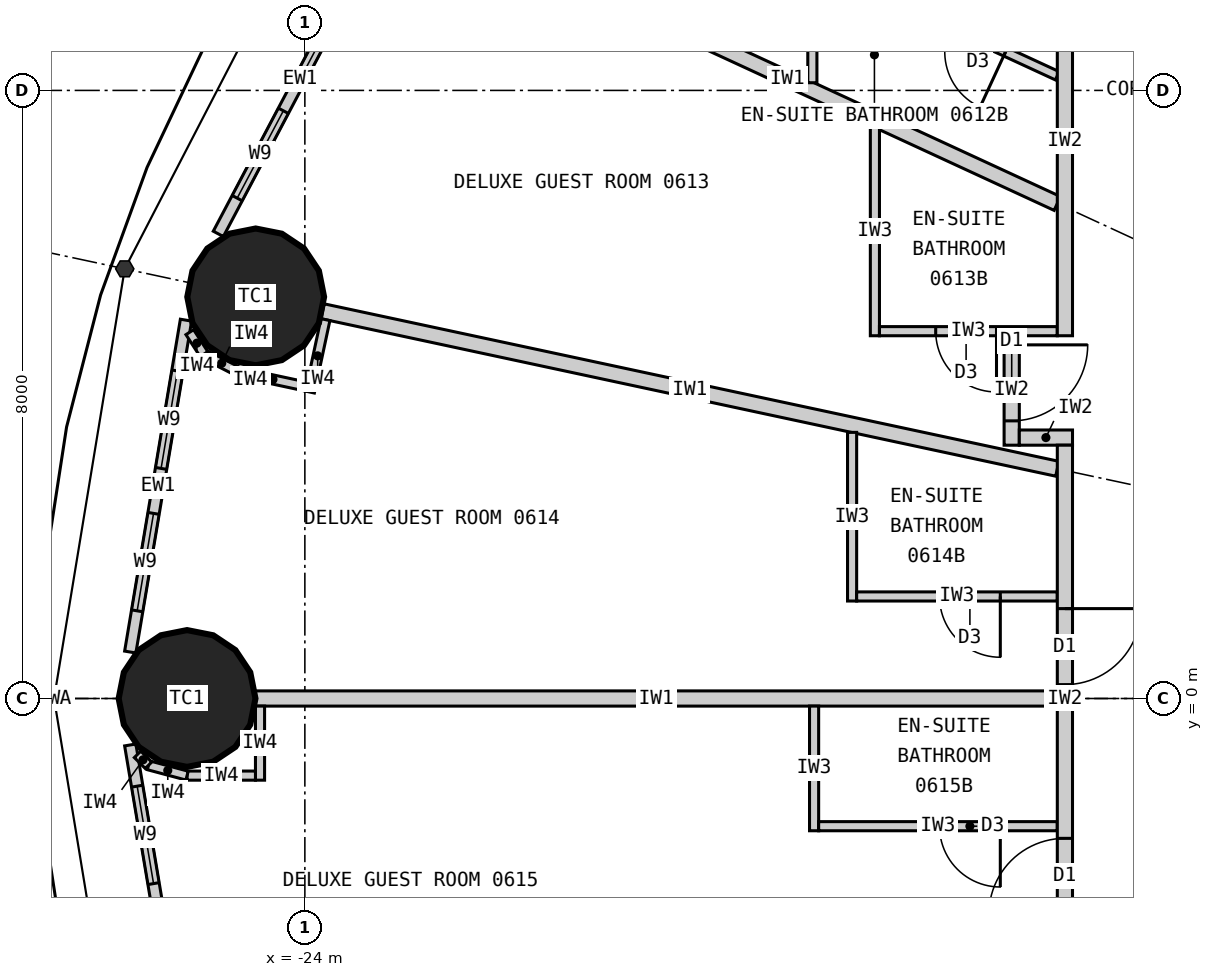
"""IFC4 building model, lengths in metres.
Left out: names, types, materials, properties, quantities, classifications, styles, units other than length and angle.
Written with IfcOpenShell. Run it as: python <this file> out.ifc"""

import sys

from ifc_helpers import new_model, si_unit, direction, frame, frame_2d, origin, origin_2d, place, context, subcontext, project, spatial, rectangle, circle, extrude, element, fill, save


model = new_model("IFC4")
c1 = context("Model", 3, precision=1e-05, world=origin(), true_north=direction((0.0, 1.0)))
c2 = subcontext(c1, "Body", "Model", "MODEL_VIEW")
j1 = project(units=[si_unit("LENGTHUNIT", "METRE"), si_unit("PLANEANGLEUNIT", "RADIAN")], contexts=[c1])
p1 = place(None, origin())
s1 = spatial("IfcSite", under=j1, at=p1, CompositionType="ELEMENT")
p2 = place(p1, origin())
s2 = spatial("IfcBuilding", under=s1, at=p2, CompositionType="ELEMENT")
p3 = place(p2, frame((0.0, 0.0, 32.7)))
s3 = spatial("IfcBuildingStorey", under=s2, at=p3, CompositionType="ELEMENT", Elevation=32.7)
for number, where, z_axis, x_axis in (
    (1, (-24.647, 5.283, 0.0), (0.0, 0.0, 1.0), (1.0, 0.0, 0.0)),
    (2, (-25.55, 0.0, 0.0), (0.0, 0.0, 1.0), (1.0, 0.0, 0.0)),
):
    element("IfcColumn", number, at=place(p3, frame(where, z_axis=z_axis, x_axis=x_axis)), inside=s3, PredefinedType="COLUMN", context=c2, shape_type="SweptSolid", body=[
        extrude(circle(Radius=0.9, at=origin_2d()), origin(), (0.0, 0.0, 1.0), 3.3),
    ])
p4 = place(p3, frame((-22.986, 10.185, 0.0), z_axis=(0.0, 0.0, 1.0), x_axis=(-0.467303182954, -0.884097129959, 0.0)))
e3 = element("IfcWall", 3, at=p4, inside=s3, PredefinedType="ELEMENTEDWALL", context=c2, shape_type="SweptSolid", body=[
    extrude(rectangle(XDim=4.606, YDim=0.15, at=frame_2d((2.303, 0.0))), origin(), (0.0, 0.0, 1.0), 3.12),
])
p5 = place(p4, frame((0.875, 0.0, 0.9)))
e4 = element("IfcOpeningElement", 4, at=p5, cuts=e3, PredefinedType="OPENING", context=c2, shape_type="SweptSolid", body=[
    extrude(rectangle(XDim=1.3, YDim=1.9, at=frame_2d((0.65, 0.95))), frame((0.0, 0.085, 0.0), z_axis=(0.0, -1.0, 0.0), x_axis=(1.0, 0.0, 0.0)), (0.0, 0.0, 1.0), 0.17),
])
p6 = place(p4, frame((2.775, 0.0, 0.9)))
e5 = element("IfcOpeningElement", 5, at=p6, cuts=e3, PredefinedType="OPENING", context=c2, shape_type="SweptSolid", body=[
    extrude(rectangle(XDim=1.3, YDim=1.9, at=frame_2d((0.65, 0.95))), frame((0.0, 0.085, 0.0), z_axis=(0.0, -1.0, 0.0), x_axis=(1.0, 0.0, 0.0)), (0.0, 0.0, 1.0), 0.17),
])
p7 = place(p3, frame((-25.564, 4.978, 0.0), z_axis=(0.0, 0.0, 1.0), x_axis=(-0.165641751141, -0.986185991727, 0.0)))
e6 = element("IfcWall", 6, at=p7, inside=s3, PredefinedType="ELEMENTEDWALL", context=c2, shape_type="SweptSolid", body=[
    extrude(rectangle(XDim=4.428, YDim=0.15, at=frame_2d((2.214, 0.0))), origin(), (0.0, 0.0, 1.0), 3.12),
])
p8 = place(p7, frame((0.678, 0.0, 0.9)))
e7 = element("IfcOpeningElement", 7, at=p8, cuts=e6, PredefinedType="OPENING", context=c2, shape_type="SweptSolid", body=[
    extrude(rectangle(XDim=1.3, YDim=1.9, at=frame_2d((0.65, 0.95))), frame((0.0, 0.085, 0.0), z_axis=(0.0, -1.0, 0.0), x_axis=(1.0, 0.0, 0.0)), (0.0, 0.0, 1.0), 0.17),
])
p9 = place(p7, frame((2.578, 0.0, 0.9)))
e8 = element("IfcOpeningElement", 8, at=p9, cuts=e6, PredefinedType="OPENING", context=c2, shape_type="SweptSolid", body=[
    extrude(rectangle(XDim=1.3, YDim=1.9, at=frame_2d((0.65, 0.95))), frame((0.0, 0.085, 0.0), z_axis=(0.0, -1.0, 0.0), x_axis=(1.0, 0.0, 0.0)), (0.0, 0.0, 1.0), 0.17),
])
p10 = place(p3, frame((-26.297, -0.611, 0.0), z_axis=(0.0, 0.0, 1.0), x_axis=(0.165641751141, -0.986185991727, 0.0)))
e9 = element("IfcWall", 9, at=p10, inside=s3, PredefinedType="ELEMENTEDWALL", context=c2, shape_type="SweptSolid", body=[
    extrude(rectangle(XDim=4.428, YDim=0.15, at=frame_2d((2.214, 0.0))), origin(), (0.0, 0.0, 1.0), 3.12),
])
p11 = place(p10, frame((0.55, 0.0, 0.9)))
e10 = element("IfcOpeningElement", 10, at=p11, cuts=e9, PredefinedType="OPENING", context=c2, shape_type="SweptSolid", body=[
    extrude(rectangle(XDim=1.3, YDim=1.9, at=frame_2d((0.65, 0.95))), frame((0.0, 0.085, 0.0), z_axis=(0.0, -1.0, 0.0), x_axis=(1.0, 0.0, 0.0)), (0.0, 0.0, 1.0), 0.17),
])
p12 = place(p10, frame((2.45, 0.0, 0.9)))
e11 = element("IfcOpeningElement", 11, at=p12, cuts=e9, PredefinedType="OPENING", context=c2, shape_type="SweptSolid", body=[
    extrude(rectangle(XDim=1.3, YDim=1.9, at=frame_2d((0.65, 0.95))), frame((0.0, 0.085, 0.0), z_axis=(0.0, -1.0, 0.0), x_axis=(1.0, 0.0, 0.0)), (0.0, 0.0, 1.0), 0.17),
])
p13 = place(p3, frame((-14.1, 6.512, 0.0), z_axis=(0.0, 0.0, 1.0), x_axis=(-0.907842433118, 0.41931147925, 0.0)))
e12 = element("IfcWall", 12, at=p13, inside=s3, PredefinedType="PARTITIONING", context=c2, shape_type="SweptSolid", body=[
    extrude(rectangle(XDim=7.823, YDim=0.2, at=frame_2d((3.912, 0.0))), origin(), (0.0, 0.0, 1.0), 2.32),
])
p14 = place(p3, frame((-14.1, 3.022, 0.0), z_axis=(0.0, 0.0, 1.0), x_axis=(-0.977786510688, 0.209603290805, 0.0)))
e13 = element("IfcWall", 13, at=p14, inside=s3, PredefinedType="PARTITIONING", context=c2, shape_type="SweptSolid", body=[
    extrude(rectangle(XDim=9.887, YDim=0.2, at=frame_2d((4.943, 0.0))), origin(), (0.0, 0.0, 1.0), 2.32),
])
p15 = place(p3, frame((-14.1, 0.0, 0.0), z_axis=(0.0, 0.0, 1.0), x_axis=(-1.0, 0.0, 0.0)))
e14 = element("IfcWall", 14, at=p15, inside=s3, PredefinedType="PARTITIONING", context=c2, shape_type="SweptSolid", body=[
    extrude(rectangle(XDim=10.55, YDim=0.2, at=frame_2d((5.275, 0.0))), origin(), (0.0, 0.0, 1.0), 2.27),
])
p16 = place(p3, frame((-17.323, 8.101, 0.0), z_axis=(0.0, 0.0, 1.0), x_axis=(0.0, 1.0, 0.0)))
e15 = element("IfcWall", 15, at=p16, inside=s3, PredefinedType="PARTITIONING", context=c2, shape_type="SweptSolid", body=[
    extrude(rectangle(XDim=1.64, YDim=0.12, at=frame_2d((0.82, 0.0))), origin(), (0.0, 0.0, 1.0), 3.12),
])
p17 = place(p3, frame((-14.1, 8.193, 0.0), z_axis=(0.0, 0.0, 1.0), x_axis=(-0.907836493557, 0.419324338628, 0.0)))
e16 = element("IfcWall", 16, at=p17, inside=s3, PredefinedType="PARTITIONING", context=c2, shape_type="SweptSolid", body=[
    extrude(rectangle(XDim=3.49, YDim=0.12, at=frame_2d((1.745, 0.0))), origin(), (0.0, 0.0, 1.0), 3.12),
])
p18 = place(p17, frame((0.75, 0.0, 0.0)))
e17 = element("IfcOpeningElement", 17, at=p18, cuts=e16, PredefinedType="OPENING", context=c2, shape_type="SweptSolid", body=[
    extrude(rectangle(XDim=0.8, YDim=2.1, at=frame_2d((0.4, 1.05))), frame((0.0, 0.07, 0.0), z_axis=(0.0, -1.0, 0.0), x_axis=(1.0, 0.0, 0.0)), (0.0, 0.0, 1.0), 0.14),
])
p19 = place(p3, frame((-16.5, 7.521, 0.0), z_axis=(0.0, 0.0, 1.0), x_axis=(0.0, -1.0, 0.0)))
e18 = element("IfcWall", 18, at=p19, inside=s3, PredefinedType="PARTITIONING", context=c2, shape_type="SweptSolid", body=[
    extrude(rectangle(XDim=2.749, YDim=0.12, at=frame_2d((1.374, 0.0))), origin(), (0.0, 0.0, 1.0), 3.12),
])
p20 = place(p3, frame((-14.1, 4.833, 0.0), z_axis=(0.0, 0.0, 1.0), x_axis=(-1.0, 0.0, 0.0)))
e19 = element("IfcWall", 19, at=p20, inside=s3, PredefinedType="PARTITIONING", context=c2, shape_type="SweptSolid", body=[
    extrude(rectangle(XDim=2.34, YDim=0.12, at=frame_2d((1.17, 0.0))), origin(), (0.0, 0.0, 1.0), 3.12),
])
p21 = place(p20, frame((0.8, 0.0, 0.0)))
e20 = element("IfcOpeningElement", 20, at=p21, cuts=e19, PredefinedType="OPENING", context=c2, shape_type="SweptSolid", body=[
    extrude(rectangle(XDim=0.8, YDim=2.1, at=frame_2d((0.4, 1.05))), frame((0.0, 0.07, 0.0), z_axis=(0.0, -1.0, 0.0), x_axis=(1.0, 0.0, 0.0)), (0.0, 0.0, 1.0), 0.14),
])
p22 = place(p3, frame((-16.8, 3.501, 0.0), z_axis=(0.0, 0.0, 1.0), x_axis=(0.0, -1.0, 0.0)))
e21 = element("IfcWall", 21, at=p22, inside=s3, PredefinedType="PARTITIONING", context=c2, shape_type="SweptSolid", body=[
    extrude(rectangle(XDim=2.219, YDim=0.12, at=frame_2d((1.109, 0.0))), origin(), (0.0, 0.0, 1.0), 3.12),
])
p23 = place(p3, frame((-14.1, 1.343, 0.0), z_axis=(0.0, 0.0, 1.0), x_axis=(-1.0, 0.0, 0.0)))
e22 = element("IfcWall", 22, at=p23, inside=s3, PredefinedType="PARTITIONING", context=c2, shape_type="SweptSolid", body=[
    extrude(rectangle(XDim=2.64, YDim=0.12, at=frame_2d((1.32, 0.0))), origin(), (0.0, 0.0, 1.0), 3.12),
])
p24 = place(p23, frame((0.75, 0.0, 0.0)))
e23 = element("IfcOpeningElement", 23, at=p24, cuts=e22, PredefinedType="OPENING", context=c2, shape_type="SweptSolid", body=[
    extrude(rectangle(XDim=0.8, YDim=2.1, at=frame_2d((0.4, 1.05))), frame((0.0, 0.07, 0.0), z_axis=(0.0, -1.0, 0.0), x_axis=(1.0, 0.0, 0.0)), (0.0, 0.0, 1.0), 0.14),
])
p25 = place(p3, frame((-17.3, -0.1, 0.0), z_axis=(0.0, 0.0, 1.0), x_axis=(0.0, -1.0, 0.0)))
e24 = element("IfcWall", 24, at=p25, inside=s3, PredefinedType="PARTITIONING", context=c2, shape_type="SweptSolid", body=[
    extrude(rectangle(XDim=1.64, YDim=0.12, at=frame_2d((0.82, 0.0))), origin(), (0.0, 0.0, 1.0), 3.12),
])
p26 = place(p3, frame((-14.1, -1.68, 0.0), z_axis=(0.0, 0.0, 1.0), x_axis=(-1.0, 0.0, 0.0)))
e25 = element("IfcWall", 25, at=p26, inside=s3, PredefinedType="PARTITIONING", context=c2, shape_type="SweptSolid", body=[
    extrude(rectangle(XDim=3.14, YDim=0.12, at=frame_2d((1.57, 0.0))), origin(), (0.0, 0.0, 1.0), 3.12),
])
p27 = place(p26, frame((0.75, 0.0, 0.0)))
e26 = element("IfcOpeningElement", 26, at=p27, cuts=e25, PredefinedType="OPENING", context=c2, shape_type="SweptSolid", body=[
    extrude(rectangle(XDim=0.8, YDim=2.1, at=frame_2d((0.4, 1.05))), frame((0.0, 0.07, 0.0), z_axis=(0.0, -1.0, 0.0), x_axis=(1.0, 0.0, 0.0)), (0.0, 0.0, 1.0), 0.14),
])
p28 = place(p3, frame((-14.7, 4.772, 0.0), z_axis=(0.0, 0.0, 1.0), x_axis=(0.0, -1.0, 0.0)))
e27 = element("IfcWall", 27, at=p28, inside=s3, PredefinedType="PARTITIONING", context=c2, shape_type="SweptSolid", body=[
    extrude(rectangle(XDim=1.44, YDim=0.2, at=frame_2d((0.72, 0.0))), origin(), (0.0, 0.0, 1.0), 3.12),
])
p29 = place(p28, frame((0.12, 0.0, 0.0)))
e28 = element("IfcOpeningElement", 28, at=p29, cuts=e27, PredefinedType="OPENING", context=c2, shape_type="SweptSolid", body=[
    extrude(rectangle(XDim=1.0, YDim=2.2, at=frame_2d((0.5, 1.1))), frame((0.0, 0.11, 0.0), z_axis=(0.0, -1.0, 0.0), x_axis=(1.0, 0.0, 0.0)), (0.0, 0.0, 1.0), 0.22),
])
p30 = place(p3, frame((-13.9, 3.433, 0.0), z_axis=(0.0, 0.0, 1.0), x_axis=(-1.0, 0.0, 0.0)))
e29 = element("IfcWall", 29, at=p30, inside=s3, PredefinedType="PARTITIONING", context=c2, shape_type="SweptSolid", body=[
    extrude(rectangle(XDim=0.7, YDim=0.2, at=frame_2d((0.35, 0.0))), origin(), (0.0, 0.0, 1.0), 2.32),
])
p31 = place(p3, frame((-14.0, 9.9, 0.0), z_axis=(0.0, 0.0, 1.0), x_axis=(0.0, -1.0, 0.0)))
e30 = element("IfcWall", 30, at=p31, inside=s3, PredefinedType="PARTITIONING", context=c2, shape_type="SweptSolid", body=[
    extrude(rectangle(XDim=5.127, YDim=0.2, at=frame_2d((2.564, 0.0))), origin(), (0.0, 0.0, 1.0), 3.12),
])
p32 = place(p31, frame((0.103, 0.0, 0.0)))
e31 = element("IfcOpeningElement", 31, at=p32, cuts=e30, PredefinedType="OPENING", context=c2, shape_type="SweptSolid", body=[
    extrude(rectangle(XDim=1.0, YDim=2.2, at=frame_2d((0.5, 1.1))), frame((0.0, 0.11, 0.0), z_axis=(0.0, -1.0, 0.0), x_axis=(1.0, 0.0, 0.0)), (0.0, 0.0, 1.0), 0.22),
])
p33 = place(p3, frame((-14.0, 3.333, 0.0), z_axis=(0.0, 0.0, 1.0), x_axis=(0.0, -1.0, 0.0)))
e32 = element("IfcWall", 32, at=p33, inside=s3, PredefinedType="PARTITIONING", context=c2, shape_type="SweptSolid", body=[
    extrude(rectangle(XDim=6.665, YDim=0.2, at=frame_2d((3.333, 0.0))), origin(), (0.0, 0.0, 1.0), 3.12),
])
p34 = place(p33, frame((2.15, 0.0, 0.0)))
e33 = element("IfcOpeningElement", 33, at=p34, cuts=e32, PredefinedType="OPENING", context=c2, shape_type="SweptSolid", body=[
    extrude(rectangle(XDim=1.0, YDim=2.2, at=frame_2d((0.5, 1.1))), frame((0.0, 0.11, 0.0), z_axis=(0.0, -1.0, 0.0), x_axis=(1.0, 0.0, 0.0)), (0.0, 0.0, 1.0), 0.22),
])
p35 = place(p33, frame((5.173, 0.0, 0.0)))
e34 = element("IfcOpeningElement", 34, at=p35, cuts=e32, PredefinedType="OPENING", context=c2, shape_type="SweptSolid", body=[
    extrude(rectangle(XDim=1.0, YDim=2.2, at=frame_2d((0.5, 1.1))), frame((0.0, 0.11, 0.0), z_axis=(0.0, -1.0, 0.0), x_axis=(1.0, 0.0, 0.0)), (0.0, 0.0, 1.0), 0.22),
])
p36 = place(p3, frame((-23.729, 4.984, 0.0), z_axis=(0.0, 0.0, 1.0), x_axis=(-0.20968306268, -0.977769406979, 0.0)))
e35 = element("IfcWall", 35, at=p36, inside=s3, PredefinedType="PARTITIONING", context=c2, shape_type="SweptSolid", body=[
    extrude(rectangle(XDim=0.975, YDim=0.12, at=frame_2d((0.487, 0.0))), origin(), (0.0, 0.0, 1.0), 3.12),
])
p37 = place(p3, frame((-23.98, 4.103, 0.0), z_axis=(0.0, 0.0, 1.0), x_axis=(-0.977762694187, 0.209714362543, 0.0)))
e36 = element("IfcWall", 36, at=p37, inside=s3, PredefinedType="PARTITIONING", context=c2, shape_type="SweptSolid", body=[
    extrude(rectangle(XDim=0.9, YDim=0.12, at=frame_2d((0.45, 0.0))), origin(), (0.0, 0.0, 1.0), 3.12),
])
p38 = place(p3, frame((-24.86, 4.291, 0.0), z_axis=(0.0, 0.0, 1.0), x_axis=(-0.890204323062, 0.455561481254, 0.0)))
e37 = element("IfcWall", 37, at=p38, inside=s3, PredefinedType="PARTITIONING", context=c2, shape_type="SweptSolid", body=[
    extrude(rectangle(XDim=0.525, YDim=0.12, at=frame_2d((0.263, 0.0))), origin(), (0.0, 0.0, 1.0), 3.12),
])
p39 = place(p3, frame((-25.327, 4.531, 0.0), z_axis=(0.0, 0.0, 1.0), x_axis=(-0.543516034791, 0.839398784801, 0.0)))
e38 = element("IfcWall", 38, at=p39, inside=s3, PredefinedType="PARTITIONING", context=c2, shape_type="SweptSolid", body=[
    extrude(rectangle(XDim=0.344, YDim=0.12, at=frame_2d((0.172, 0.0))), origin(), (0.0, 0.0, 1.0), 3.12),
])
p40 = place(p3, frame((-24.59, -0.1, 0.0), z_axis=(0.0, 0.0, 1.0), x_axis=(0.0, -1.0, 0.0)))
e39 = element("IfcWall", 39, at=p40, inside=s3, PredefinedType="PARTITIONING", context=c2, shape_type="SweptSolid", body=[
    extrude(rectangle(XDim=0.974, YDim=0.12, at=frame_2d((0.487, 0.0))), origin(), (0.0, 0.0, 1.0), 3.12),
])
p41 = place(p3, frame((-24.65, -1.015, 0.0), z_axis=(0.0, 0.0, 1.0), x_axis=(-1.0, 0.0, 0.0)))
e40 = element("IfcWall", 40, at=p41, inside=s3, PredefinedType="PARTITIONING", context=c2, shape_type="SweptSolid", body=[
    extrude(rectangle(XDim=0.9, YDim=0.12, at=frame_2d((0.45, 0.0))), origin(), (0.0, 0.0, 1.0), 3.12),
])
p42 = place(p3, frame((-25.55, -1.015, 0.0), z_axis=(0.0, 0.0, 1.0), x_axis=(-0.96590239779, 0.258906465625, 0.0)))
e41 = element("IfcWall", 41, at=p42, inside=s3, PredefinedType="PARTITIONING", context=c2, shape_type="SweptSolid", body=[
    extrude(rectangle(XDim=0.525, YDim=0.12, at=frame_2d((0.263, 0.0))), origin(), (0.0, 0.0, 1.0), 3.12),
])
p43 = place(p3, frame((-26.057, -0.879, 0.0), z_axis=(0.0, 0.0, 1.0), x_axis=(-0.707106781187, 0.707106781187, 0.0)))
e42 = element("IfcWall", 42, at=p43, inside=s3, PredefinedType="PARTITIONING", context=c2, shape_type="SweptSolid", body=[
    extrude(rectangle(XDim=0.204, YDim=0.12, at=frame_2d((0.102, 0.0))), origin(), (0.0, 0.0, 1.0), 3.12),
])
p44 = place(p5, origin())
e43 = element("IfcWindow", 43, at=p44, inside=s3, PartitioningType="SINGLE_PANEL", PredefinedType="WINDOW", context=c2, shape_type="SweptSolid", body=[
    extrude(rectangle(XDim=1.3, YDim=1.9, at=frame_2d((0.65, 0.95))), frame((0.0, 0.03, 0.0), z_axis=(0.0, -1.0, 0.0), x_axis=(1.0, 0.0, 0.0)), (0.0, 0.0, 1.0), 0.06),
])
fill(e4, e43)
p45 = place(p6, origin())
e44 = element("IfcWindow", 44, at=p45, inside=s3, PartitioningType="SINGLE_PANEL", PredefinedType="WINDOW", context=c2, shape_type="SweptSolid", body=[
    extrude(rectangle(XDim=1.3, YDim=1.9, at=frame_2d((0.65, 0.95))), frame((0.0, 0.03, 0.0), z_axis=(0.0, -1.0, 0.0), x_axis=(1.0, 0.0, 0.0)), (0.0, 0.0, 1.0), 0.06),
])
fill(e5, e44)
p46 = place(p8, origin())
e45 = element("IfcWindow", 45, at=p46, inside=s3, PartitioningType="SINGLE_PANEL", PredefinedType="WINDOW", context=c2, shape_type="SweptSolid", body=[
    extrude(rectangle(XDim=1.3, YDim=1.9, at=frame_2d((0.65, 0.95))), frame((0.0, 0.03, 0.0), z_axis=(0.0, -1.0, 0.0), x_axis=(1.0, 0.0, 0.0)), (0.0, 0.0, 1.0), 0.06),
])
fill(e7, e45)
p47 = place(p9, origin())
e46 = element("IfcWindow", 46, at=p47, inside=s3, PartitioningType="SINGLE_PANEL", PredefinedType="WINDOW", context=c2, shape_type="SweptSolid", body=[
    extrude(rectangle(XDim=1.3, YDim=1.9, at=frame_2d((0.65, 0.95))), frame((0.0, 0.03, 0.0), z_axis=(0.0, -1.0, 0.0), x_axis=(1.0, 0.0, 0.0)), (0.0, 0.0, 1.0), 0.06),
])
fill(e8, e46)
p48 = place(p11, origin())
e47 = element("IfcWindow", 47, at=p48, inside=s3, PartitioningType="SINGLE_PANEL", PredefinedType="WINDOW", context=c2, shape_type="SweptSolid", body=[
    extrude(rectangle(XDim=1.3, YDim=1.9, at=frame_2d((0.65, 0.95))), frame((0.0, 0.03, 0.0), z_axis=(0.0, -1.0, 0.0), x_axis=(1.0, 0.0, 0.0)), (0.0, 0.0, 1.0), 0.06),
])
fill(e10, e47)
p49 = place(p18, origin())
e48 = element("IfcDoor", 48, at=p49, inside=s3, OperationType="SINGLE_SWING_LEFT", PredefinedType="DOOR", context=c2, shape_type="SweptSolid", body=[
    extrude(rectangle(XDim=0.8, YDim=2.1, at=frame_2d((0.4, 1.05))), frame((0.0, 0.025, 0.0), z_axis=(0.0, -1.0, 0.0), x_axis=(1.0, 0.0, 0.0)), (0.0, 0.0, 1.0), 0.05),
])
fill(e17, e48)
p50 = place(p21, origin())
e49 = element("IfcDoor", 49, at=p50, inside=s3, OperationType="SINGLE_SWING_LEFT", PredefinedType="DOOR", context=c2, shape_type="SweptSolid", body=[
    extrude(rectangle(XDim=0.8, YDim=2.1, at=frame_2d((0.4, 1.05))), frame((0.0, 0.025, 0.0), z_axis=(0.0, -1.0, 0.0), x_axis=(1.0, 0.0, 0.0)), (0.0, 0.0, 1.0), 0.05),
])
fill(e20, e49)
p51 = place(p29, origin())
e50 = element("IfcDoor", 50, at=p51, inside=s3, OperationType="SINGLE_SWING_LEFT", PredefinedType="DOOR", context=c2, shape_type="SweptSolid", body=[
    extrude(rectangle(XDim=1.0, YDim=2.2, at=frame_2d((0.5, 1.1))), frame((0.0, 0.025, 0.0), z_axis=(0.0, -1.0, 0.0), x_axis=(1.0, 0.0, 0.0)), (0.0, 0.0, 1.0), 0.05),
])
fill(e28, e50)
p52 = place(p24, origin())
e51 = element("IfcDoor", 51, at=p52, inside=s3, OperationType="SINGLE_SWING_LEFT", PredefinedType="DOOR", context=c2, shape_type="SweptSolid", body=[
    extrude(rectangle(XDim=0.8, YDim=2.1, at=frame_2d((0.4, 1.05))), frame((0.0, 0.025, 0.0), z_axis=(0.0, -1.0, 0.0), x_axis=(1.0, 0.0, 0.0)), (0.0, 0.0, 1.0), 0.05),
])
fill(e23, e51)
p53 = place(p34, origin())
e52 = element("IfcDoor", 52, at=p53, inside=s3, OperationType="SINGLE_SWING_LEFT", PredefinedType="DOOR", context=c2, shape_type="SweptSolid", body=[
    extrude(rectangle(XDim=1.0, YDim=2.2, at=frame_2d((0.5, 1.1))), frame((0.0, 0.025, 0.0), z_axis=(0.0, -1.0, 0.0), x_axis=(1.0, 0.0, 0.0)), (0.0, 0.0, 1.0), 0.05),
])
fill(e33, e52)
p54 = place(p27, origin())
e53 = element("IfcDoor", 53, at=p54, inside=s3, OperationType="SINGLE_SWING_LEFT", PredefinedType="DOOR", context=c2, shape_type="SweptSolid", body=[
    extrude(rectangle(XDim=0.8, YDim=2.1, at=frame_2d((0.4, 1.05))), frame((0.0, 0.025, 0.0), z_axis=(0.0, -1.0, 0.0), x_axis=(1.0, 0.0, 0.0)), (0.0, 0.0, 1.0), 0.05),
])
fill(e26, e53)
p55 = place(p35, origin())
e54 = element("IfcDoor", 54, at=p55, inside=s3, OperationType="SINGLE_SWING_RIGHT", PredefinedType="DOOR", context=c2, shape_type="SweptSolid", body=[
    extrude(rectangle(XDim=1.0, YDim=2.2, at=frame_2d((0.5, 1.1))), frame((0.0, 0.025, 0.0), z_axis=(0.0, -1.0, 0.0), x_axis=(1.0, 0.0, 0.0)), (0.0, 0.0, 1.0), 0.05),
])
fill(e34, e54)
save(model, sys.argv[1])
